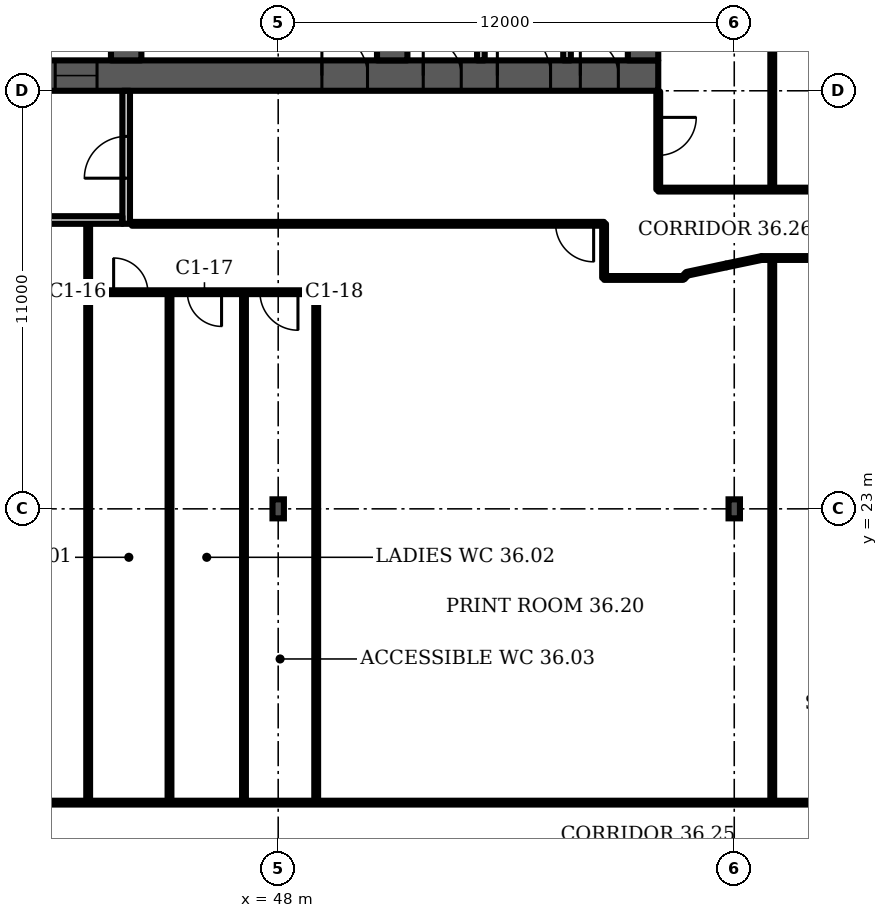
"""IFC4 building model, lengths in metres.
Left out: names, types, materials, properties, quantities, classifications, styles, units other than length and angle.
Written with IfcOpenShell. Run it as: python <this file> out.ifc"""

import sys

from ifc_helpers import new_model, si_unit, direction, frame, frame_2d, origin, origin_2d, place, context, subcontext, project, spatial, polyline, rectangle, i_section, outline, extrude, element, fill, save


model = new_model("IFC4")
c1 = context("Model", 3, precision=1e-05, world=origin(), true_north=direction((0.0, 1.0)))
c2 = subcontext(c1, "Body", "Model", "MODEL_VIEW")
j1 = project(units=[si_unit("LENGTHUNIT", "METRE"), si_unit("PLANEANGLEUNIT", "RADIAN")], contexts=[c1])
p1 = place(None, origin())
s1 = spatial("IfcSite", under=j1, at=p1, CompositionType="ELEMENT")
p2 = place(p1, origin())
s2 = spatial("IfcBuilding", under=s1, at=p2, CompositionType="ELEMENT")
p3 = place(p2, frame((0.0, 0.0, 151.9)))
s3 = spatial("IfcBuildingStorey", under=s2, at=p3, CompositionType="ELEMENT", Elevation=151.9)
p4 = place(p3, frame((16.0, 34.4, 0.0), z_axis=(0.0, 0.0, 1.0), x_axis=(1.0, 0.0, 0.0)))
e1 = element("IfcWall", 1, at=p4, inside=s3, PredefinedType="SHEAR", context=c2, shape_type="SweptSolid", body=[
    extrude(rectangle(XDim=42.0, YDim=0.8, at=frame_2d((21.0, 0.0))), origin(), (0.0, 0.0, 1.0), 3.6),
])
p5 = place(p4, frame((3.2, 0.0, 0.0)))
e2 = element("IfcOpeningElement", 2, at=p5, cuts=e1, PredefinedType="OPENING", context=c2, shape_type="SweptSolid", body=[
    extrude(rectangle(XDim=1.0, YDim=2.1, at=frame_2d((0.5, 1.05))), frame((0.0, 0.41, 0.0), z_axis=(0.0, -1.0, 0.0), x_axis=(1.0, 0.0, 0.0)), (0.0, 0.0, 1.0), 0.82),
])
p6 = place(p4, frame((7.65, 0.0, 0.0)))
e3 = element("IfcOpeningElement", 3, at=p6, cuts=e1, PredefinedType="OPENING", context=c2, shape_type="SweptSolid", body=[
    extrude(rectangle(XDim=1.2, YDim=2.1, at=frame_2d((0.6, 1.05))), frame((0.0, 0.41, 0.0), z_axis=(0.0, -1.0, 0.0), x_axis=(1.0, 0.0, 0.0)), (0.0, 0.0, 1.0), 0.82),
])
p7 = place(p4, frame((14.767, 0.0, 0.0)))
e4 = element("IfcOpeningElement", 4, at=p7, cuts=e1, PredefinedType="OPENING", context=c2, shape_type="SweptSolid", body=[
    extrude(rectangle(XDim=1.1, YDim=2.1, at=frame_2d((0.55, 1.05))), frame((0.0, 0.41, 0.0), z_axis=(0.0, -1.0, 0.0), x_axis=(1.0, 0.0, 0.0)), (0.0, 0.0, 1.0), 0.82),
])
p8 = place(p4, frame((19.133, 0.0, 0.0)))
e5 = element("IfcOpeningElement", 5, at=p8, cuts=e1, PredefinedType="OPENING", context=c2, shape_type="SweptSolid", body=[
    extrude(rectangle(XDim=1.1, YDim=2.1, at=frame_2d((0.55, 1.05))), frame((0.0, 0.41, 0.0), z_axis=(0.0, -1.0, 0.0), x_axis=(1.0, 0.0, 0.0)), (0.0, 0.0, 1.0), 0.82),
])
p9 = place(p4, frame((16.8, 0.0, 0.0)))
e6 = element("IfcOpeningElement", 6, at=p9, cuts=e1, PredefinedType="OPENING", context=c2, shape_type="SweptSolid", body=[
    extrude(rectangle(XDim=1.4, YDim=2.1, at=frame_2d((0.7, 1.05))), frame((0.0, 0.41, 0.0), z_axis=(0.0, -1.0, 0.0), x_axis=(1.0, 0.0, 0.0)), (0.0, 0.0, 1.0), 0.82),
])
p10 = place(p4, frame((21.767, 0.0, 0.0)))
e7 = element("IfcOpeningElement", 7, at=p10, cuts=e1, PredefinedType="OPENING", context=c2, shape_type="SweptSolid", body=[
    extrude(rectangle(XDim=1.1, YDim=2.1, at=frame_2d((0.55, 1.05))), frame((0.0, 0.41, 0.0), z_axis=(0.0, -1.0, 0.0), x_axis=(1.0, 0.0, 0.0)), (0.0, 0.0, 1.0), 0.82),
])
p11 = place(p4, frame((23.95, 0.0, 0.0)))
e8 = element("IfcOpeningElement", 8, at=p11, cuts=e1, PredefinedType="OPENING", context=c2, shape_type="SweptSolid", body=[
    extrude(rectangle(XDim=1.1, YDim=2.1, at=frame_2d((0.55, 1.05))), frame((0.0, 0.41, 0.0), z_axis=(0.0, -1.0, 0.0), x_axis=(1.0, 0.0, 0.0)), (0.0, 0.0, 1.0), 0.82),
])
p12 = place(p4, frame((26.133, 0.0, 0.0)))
e9 = element("IfcOpeningElement", 9, at=p12, cuts=e1, PredefinedType="OPENING", context=c2, shape_type="SweptSolid", body=[
    extrude(rectangle(XDim=1.1, YDim=2.1, at=frame_2d((0.55, 1.05))), frame((0.0, 0.41, 0.0), z_axis=(0.0, -1.0, 0.0), x_axis=(1.0, 0.0, 0.0)), (0.0, 0.0, 1.0), 0.82),
])
p13 = place(p4, frame((33.15, 0.0, 0.0)))
e10 = element("IfcOpeningElement", 10, at=p13, cuts=e1, PredefinedType="OPENING", context=c2, shape_type="SweptSolid", body=[
    extrude(rectangle(XDim=1.2, YDim=2.1, at=frame_2d((0.6, 1.05))), frame((0.0, 0.41, 0.0), z_axis=(0.0, -1.0, 0.0), x_axis=(1.0, 0.0, 0.0)), (0.0, 0.0, 1.0), 0.82),
])
p14 = place(p4, frame((35.817, 0.0, 0.0)))
e11 = element("IfcOpeningElement", 11, at=p14, cuts=e1, PredefinedType="OPENING", context=c2, shape_type="SweptSolid", body=[
    extrude(rectangle(XDim=1.0, YDim=2.1, at=frame_2d((0.5, 1.05))), frame((0.0, 0.41, 0.0), z_axis=(0.0, -1.0, 0.0), x_axis=(1.0, 0.0, 0.0)), (0.0, 0.0, 1.0), 0.82),
])
p15 = place(p4, frame((39.95, 0.0, 0.0)))
e12 = element("IfcOpeningElement", 12, at=p15, cuts=e1, PredefinedType="OPENING", context=c2, shape_type="SweptSolid", body=[
    extrude(rectangle(XDim=1.0, YDim=2.1, at=frame_2d((0.5, 1.05))), frame((0.0, 0.41, 0.0), z_axis=(0.0, -1.0, 0.0), x_axis=(1.0, 0.0, 0.0)), (0.0, 0.0, 1.0), 0.82),
])
p16 = place(p4, frame((37.767, 0.0, 0.0)))
e13 = element("IfcOpeningElement", 13, at=p16, cuts=e1, PredefinedType="OPENING", context=c2, shape_type="SweptSolid", body=[
    extrude(rectangle(XDim=1.4, YDim=2.1, at=frame_2d((0.7, 1.05))), frame((0.0, 0.41, 0.0), z_axis=(0.0, -1.0, 0.0), x_axis=(1.0, 0.0, 0.0)), (0.0, 0.0, 1.0), 0.82),
])
p17 = place(p3, frame((44.0, 34.8, 0.0), z_axis=(0.0, 0.0, 1.0), x_axis=(0.0, 1.0, 0.0)))
e14 = element("IfcWall", 14, at=p17, inside=s3, PredefinedType="SHEAR", context=c2, shape_type="SweptSolid", body=[
    extrude(rectangle(XDim=14.374, YDim=0.8, at=frame_2d((7.187, 0.0))), origin(), (0.0, 0.0, 1.0), 3.6),
])
p18 = place(p17, frame((11.312, 0.0, 0.0)))
e15 = element("IfcOpeningElement", 15, at=p18, cuts=e14, PredefinedType="OPENING", context=c2, shape_type="SweptSolid", body=[
    extrude(rectangle(XDim=1.0, YDim=2.1, at=frame_2d((0.5, 1.05))), frame((0.0, 0.41, 0.0), z_axis=(0.0, -1.0, 0.0), x_axis=(1.0, 0.0, 0.0)), (0.0, 0.0, 1.0), 0.82),
])
p19 = place(p17, frame((3.6, 0.0, 0.0)))
e16 = element("IfcOpeningElement", 16, at=p19, cuts=e14, PredefinedType="OPENING", context=c2, shape_type="SweptSolid", body=[
    extrude(rectangle(XDim=1.1, YDim=2.1, at=frame_2d((0.55, 1.05))), frame((0.0, 0.41, 0.0), z_axis=(0.0, -1.0, 0.0), x_axis=(1.0, 0.0, 0.0)), (0.0, 0.0, 1.0), 0.82),
])
p20 = place(p3, frame((51.0, 34.8, 0.0), z_axis=(0.0, 0.0, 1.0), x_axis=(0.0, 1.0, 0.0)))
e17 = element("IfcWall", 17, at=p20, inside=s3, PredefinedType="SHEAR", context=c2, shape_type="SweptSolid", body=[
    extrude(rectangle(XDim=13.762, YDim=0.8, at=frame_2d((6.881, 0.0))), origin(), (0.0, 0.0, 1.0), 3.6),
])
p21 = place(p20, frame((3.6, 0.0, 0.0)))
e18 = element("IfcOpeningElement", 18, at=p21, cuts=e17, PredefinedType="OPENING", context=c2, shape_type="SweptSolid", body=[
    extrude(rectangle(XDim=1.1, YDim=2.1, at=frame_2d((0.55, 1.05))), frame((0.0, 0.41, 0.0), z_axis=(0.0, -1.0, 0.0), x_axis=(1.0, 0.0, 0.0)), (0.0, 0.0, 1.0), 0.82),
])
p22 = place(p3, frame((57.6, 34.8, 0.0), z_axis=(0.0, 0.0, 1.0), x_axis=(0.0, 1.0, 0.0)))
e19 = element("IfcWall", 19, at=p22, inside=s3, PredefinedType="SHEAR", context=c2, shape_type="SweptSolid", body=[
    extrude(rectangle(XDim=13.184, YDim=0.8, at=frame_2d((6.592, 0.0))), origin(), (0.0, 0.0, 1.0), 3.6),
])
for number, where, z_axis, x_axis in (
    (20, (48.0, 23.0, 0.0), (0.0, 0.0, 1.0), (1.0, 0.0, 0.0)),
    (21, (60.0, 23.0, 0.0), (0.0, 0.0, 1.0), (1.0, 0.0, 0.0)),
):
    element("IfcColumn", number, at=place(p3, frame(where, z_axis=z_axis, x_axis=x_axis)), inside=s3, PredefinedType="COLUMN", context=c2, shape_type="SweptSolid", body=[
        extrude(i_section(OverallWidth=0.3, OverallDepth=0.5, WebThickness=0.014, FlangeThickness=0.028, FilletRadius=0.027, at=origin_2d()), origin(), (0.0, 0.0, 1.0), 3.6),
    ])
p23 = place(p3, origin())
e22 = element("IfcWall", 22, at=p23, inside=s3, PredefinedType="PARTITIONING", context=c2, shape_type="SweptSolid", body=[
    extrude(outline(polyline([(41.567, 37.1), (39.433, 37.1), (39.433, 34.8), (39.233, 34.8), (39.233, 37.65), (37.4, 37.65), (37.4, 37.85), (39.233, 37.85), (39.433, 37.85), (39.433, 37.3), (41.567, 37.3), (41.567, 37.55), (41.767, 37.55), (43.6, 37.55), (43.6, 37.35), (41.767, 37.35), (41.767, 34.8), (41.567, 34.8), (41.567, 37.1)])), origin(), (0.0, 0.0, 1.0), 3.2),
])
p24 = place(p3, origin())
e23 = element("IfcWall", 23, at=p24, inside=s3, PredefinedType="PARTITIONING", context=c2, shape_type="SweptSolid", body=[
    extrude(outline(polyline([(53.233, 34.8), (53.233, 37.3), (53.433, 37.3), (53.433, 34.8), (53.233, 34.8)])), origin(), (0.0, 0.0, 1.0), 3.2),
])
p25 = place(p3, origin())
e24 = element("IfcWall", 24, at=p25, inside=s3, PredefinedType="PARTITIONING", context=c2, shape_type="SweptSolid", body=[
    extrude(outline(polyline([(55.5, 34.8), (55.5, 37.3), (55.7, 37.3), (55.7, 34.8), (55.5, 34.8)])), origin(), (0.0, 0.0, 1.0), 3.2),
])
p26 = place(p3, frame((44.0, 30.5, 0.0), z_axis=(0.0, 0.0, 1.0), x_axis=(0.0, 1.0, 0.0)))
e25 = element("IfcWall", 25, at=p26, inside=s3, PredefinedType="PARTITIONING", context=c2, shape_type="SweptSolid", body=[
    extrude(rectangle(XDim=3.5, YDim=0.2, at=frame_2d((1.75, 0.0))), origin(), (0.0, 0.0, 1.0), 3.2),
])
p27 = place(p26, frame((1.2, 0.0, 0.0)))
e26 = element("IfcOpeningElement", 26, at=p27, cuts=e25, PredefinedType="OPENING", context=c2, shape_type="SweptSolid", body=[
    extrude(rectangle(XDim=1.1, YDim=2.1, at=frame_2d((0.55, 1.05))), frame((0.0, 0.11, 0.0), z_axis=(0.0, -1.0, 0.0), x_axis=(1.0, 0.0, 0.0)), (0.0, 0.0, 1.0), 0.22),
])
p28 = place(p3, frame((41.1, 30.6, 0.0), z_axis=(0.0, 0.0, 1.0), x_axis=(1.0, 0.0, 0.0)))
e27 = element("IfcWall", 27, at=p28, inside=s3, PredefinedType="PARTITIONING", context=c2, shape_type="SweptSolid", body=[
    extrude(rectangle(XDim=2.8, YDim=0.2, at=frame_2d((1.4, 0.0))), origin(), (0.0, 0.0, 1.0), 3.2),
])
p29 = place(p3, frame((18.2, 15.27, 0.0), z_axis=(0.0, 0.0, 1.0), x_axis=(1.0, 0.0, 0.0)))
e28 = element("IfcWall", 28, at=p29, inside=s3, PredefinedType="PARTITIONING", context=c2, shape_type="SweptSolid", body=[
    extrude(rectangle(XDim=62.291, YDim=0.1, at=frame_2d((31.146, 0.0))), origin(), (0.0, 0.0, 1.0), 2.58),
])
p30 = place(p29, frame((0.38, 0.0, 0.0)))
e29 = element("IfcOpeningElement", 29, at=p30, cuts=e28, PredefinedType="OPENING", context=c2, shape_type="SweptSolid", body=[
    extrude(rectangle(XDim=1.0, YDim=2.1, at=frame_2d((0.5, 1.05))), frame((0.0, 0.06, 0.0), z_axis=(0.0, -1.0, 0.0), x_axis=(1.0, 0.0, 0.0)), (0.0, 0.0, 1.0), 0.12),
])
p31 = place(p29, frame((58.102, 0.0, 0.0)))
e30 = element("IfcOpeningElement", 30, at=p31, cuts=e28, PredefinedType="OPENING", context=c2, shape_type="SweptSolid", body=[
    extrude(rectangle(XDim=1.0, YDim=2.1, at=frame_2d((0.5, 1.05))), frame((0.0, 0.06, 0.0), z_axis=(0.0, -1.0, 0.0), x_axis=(1.0, 0.0, 0.0)), (0.0, 0.0, 1.0), 0.12),
])
p32 = place(p3, frame((43.0, 15.27, 0.0), z_axis=(0.0, 0.0, 1.0), x_axis=(0.0, 1.0, 0.0)))
e31 = element("IfcWall", 31, at=p32, inside=s3, PredefinedType="PARTITIONING", context=c2, shape_type="SweptSolid", body=[
    extrude(rectangle(XDim=15.22, YDim=0.1, at=frame_2d((7.61, 0.0))), origin(), (0.0, 0.0, 1.0), 3.2),
])
p33 = place(p3, frame((43.0, 28.7, 0.0), z_axis=(0.0, 0.0, 1.0), x_axis=(1.0, 0.0, 0.0)))
e32 = element("IfcWall", 32, at=p33, inside=s3, PredefinedType="PARTITIONING", context=c2, shape_type="SweptSolid", body=[
    extrude(rectangle(XDim=6.0, YDim=0.1, at=frame_2d((3.0, 0.0))), origin(), (0.0, 0.0, 1.0), 3.2),
])
p34 = place(p33, frame((0.67, 0.0, 0.0)))
e33 = element("IfcOpeningElement", 33, at=p34, cuts=e32, PredefinedType="OPENING", context=c2, shape_type="SweptSolid", body=[
    extrude(rectangle(XDim=0.9, YDim=2.1, at=frame_2d((0.45, 1.05))), frame((0.0, 0.06, 0.0), z_axis=(0.0, -1.0, 0.0), x_axis=(1.0, 0.0, 0.0)), (0.0, 0.0, 1.0), 0.12),
])
p35 = place(p33, frame((2.61, 0.0, 0.0)))
e34 = element("IfcOpeningElement", 34, at=p35, cuts=e32, PredefinedType="OPENING", context=c2, shape_type="SweptSolid", body=[
    extrude(rectangle(XDim=0.9, YDim=2.1, at=frame_2d((0.45, 1.05))), frame((0.0, 0.06, 0.0), z_axis=(0.0, -1.0, 0.0), x_axis=(1.0, 0.0, 0.0)), (0.0, 0.0, 1.0), 0.12),
])
p36 = place(p33, frame((4.52, 0.0, 0.0)))
e35 = element("IfcOpeningElement", 35, at=p36, cuts=e32, PredefinedType="OPENING", context=c2, shape_type="SweptSolid", body=[
    extrude(rectangle(XDim=1.0, YDim=2.1, at=frame_2d((0.5, 1.05))), frame((0.0, 0.06, 0.0), z_axis=(0.0, -1.0, 0.0), x_axis=(1.0, 0.0, 0.0)), (0.0, 0.0, 1.0), 0.12),
])
for number, where, z_axis, x_axis in (
    (36, (45.14, 15.27, 0.0), (0.0, 0.0, 1.0), (0.0, 1.0, 0.0)),
    (37, (47.1, 15.27, 0.0), (0.0, 0.0, 1.0), (0.0, 1.0, 0.0)),
    (38, (49.0, 15.27, 0.0), (0.0, 0.0, 1.0), (0.0, 1.0, 0.0)),
):
    element("IfcWall", number, at=place(p3, frame(where, z_axis=z_axis, x_axis=x_axis)), inside=s3, PredefinedType="PARTITIONING", context=c2, shape_type="SweptSolid", body=[
        extrude(rectangle(XDim=13.43, YDim=0.1, at=frame_2d((6.715, 0.0))), origin(), (0.0, 0.0, 1.0), 3.2),
    ])
p37 = place(p3, frame((56.575, 29.075, 0.0), z_axis=(0.0, 0.0, 1.0), x_axis=(0.0, 1.0, 0.0)))
e39 = element("IfcWall", 39, at=p37, inside=s3, PredefinedType="PARTITIONING", context=c2, shape_type="SweptSolid", body=[
    extrude(rectangle(XDim=1.425, YDim=0.1, at=frame_2d((0.712, 0.0))), origin(), (0.0, 0.0, 1.0), 3.2),
])
p38 = place(p3, frame((56.575, 29.075, 0.0), z_axis=(0.0, 0.0, 1.0), x_axis=(1.0, 0.0, 0.0)))
e40 = element("IfcWall", 40, at=p38, inside=s3, PredefinedType="PARTITIONING", context=c2, shape_type="SweptSolid", body=[
    extrude(rectangle(XDim=2.08, YDim=0.1, at=frame_2d((1.04, 0.0))), origin(), (0.0, 0.0, 1.0), 3.2),
])
p39 = place(p3, frame((58.0, 31.4, 0.0), z_axis=(0.0, 0.0, 1.0), x_axis=(0.0, 1.0, 0.0)))
e41 = element("IfcWall", 41, at=p39, inside=s3, PredefinedType="PARTITIONING", context=c2, shape_type="SweptSolid", body=[
    extrude(rectangle(XDim=2.58, YDim=0.1, at=frame_2d((1.29, 0.0))), origin(), (0.0, 0.0, 1.0), 3.2),
])
p40 = place(p39, frame((0.9, 0.0, 0.0)))
e42 = element("IfcOpeningElement", 42, at=p40, cuts=e41, PredefinedType="OPENING", context=c2, shape_type="SweptSolid", body=[
    extrude(rectangle(XDim=1.0, YDim=2.1, at=frame_2d((0.5, 1.05))), frame((0.0, 0.06, 0.0), z_axis=(0.0, -1.0, 0.0), x_axis=(1.0, 0.0, 0.0)), (0.0, 0.0, 1.0), 0.12),
])
p41 = place(p3, frame((58.0, 31.4, 0.0), z_axis=(0.0, 0.0, 1.0), x_axis=(1.0, 0.0, 0.0)))
e43 = element("IfcWall", 43, at=p41, inside=s3, PredefinedType="PARTITIONING", context=c2, shape_type="SweptSolid", body=[
    extrude(rectangle(XDim=5.905, YDim=0.1, at=frame_2d((2.953, 0.0))), origin(), (0.0, 0.0, 1.0), 3.2),
])
p42 = place(p3, frame((58.655, 29.075, 0.0), z_axis=(0.0, 0.0, 1.0), x_axis=(0.671773, 0.740757, 0.0)))
e44 = element("IfcWall", 44, at=p42, inside=s3, PredefinedType="PARTITIONING", context=c2, shape_type="SweptSolid", body=[
    extrude(rectangle(XDim=0.149, YDim=0.1, at=frame_2d((0.074, 0.0))), origin(), (0.0, 0.0, 1.0), 3.2),
])
p43 = place(p3, frame((58.755, 29.185, 0.0), z_axis=(0.0, 0.0, 1.0), x_axis=(0.97816, 0.207859, 0.0)))
e45 = element("IfcWall", 45, at=p43, inside=s3, PredefinedType="PARTITIONING", context=c2, shape_type="SweptSolid", body=[
    extrude(rectangle(XDim=1.058, YDim=0.1, at=frame_2d((0.529, 0.0))), origin(), (0.0, 0.0, 1.0), 3.2),
])
p44 = place(p3, frame((59.79, 29.405, 0.0), z_axis=(0.0, 0.0, 1.0), x_axis=(0.978703, 0.205299, 0.0)))
e46 = element("IfcWall", 46, at=p44, inside=s3, PredefinedType="PARTITIONING", context=c2, shape_type="SweptSolid", body=[
    extrude(rectangle(XDim=0.95, YDim=0.1, at=frame_2d((0.475, 0.0))), origin(), (0.0, 0.0, 1.0), 3.2),
])
p45 = place(p3, frame((60.72, 29.6, 0.0), z_axis=(0.0, 0.0, 1.0), x_axis=(1.0, 0.0, 0.0)))
e47 = element("IfcWall", 47, at=p45, inside=s3, PredefinedType="PARTITIONING", context=c2, shape_type="SweptSolid", body=[
    extrude(rectangle(XDim=1.385, YDim=0.1, at=frame_2d((0.692, 0.0))), origin(), (0.0, 0.0, 1.0), 3.2),
])
p46 = place(p3, frame((61.0, 15.27, 0.0), z_axis=(0.0, 0.0, 1.0), x_axis=(0.0, 1.0, 0.0)))
e48 = element("IfcWall", 48, at=p46, inside=s3, PredefinedType="PARTITIONING", context=c2, shape_type="SweptSolid", body=[
    extrude(rectangle(XDim=14.33, YDim=0.1, at=frame_2d((7.165, 0.0))), origin(), (0.0, 0.0, 1.0), 3.2),
])
p47 = place(p3, frame((61.0, 31.4, 0.0), z_axis=(0.0, 0.0, 1.0), x_axis=(0.0, 1.0, 0.0)))
e49 = element("IfcWall", 49, at=p47, inside=s3, PredefinedType="PARTITIONING", context=c2, shape_type="SweptSolid", body=[
    extrude(rectangle(XDim=10.58, YDim=0.1, at=frame_2d((5.29, 0.0))), origin(), (0.0, 0.0, 1.0), 3.2),
])
p48 = place(p3, frame((44.15, 30.5, 0.0), z_axis=(0.0, 0.0, 1.0), x_axis=(1.0, 0.0, 0.0)))
e50 = element("IfcWall", 50, at=p48, inside=s3, PredefinedType="PARTITIONING", context=c2, shape_type="SweptSolid", body=[
    extrude(rectangle(XDim=12.425, YDim=0.1, at=frame_2d((6.212, 0.0))), origin(), (0.0, 0.0, 1.0), 3.2),
])
p49 = place(p48, frame((11.15, 0.0, 0.0)))
e51 = element("IfcOpeningElement", 51, at=p49, cuts=e50, PredefinedType="OPENING", context=c2, shape_type="SweptSolid", body=[
    extrude(rectangle(XDim=1.0, YDim=2.1, at=frame_2d((0.5, 1.05))), frame((0.0, 0.06, 0.0), z_axis=(0.0, -1.0, 0.0), x_axis=(1.0, 0.0, 0.0)), (0.0, 0.0, 1.0), 0.12),
])
p50 = place(p12, origin())
e52 = element("IfcDoor", 52, at=p50, inside=s3, OperationType="DOUBLE_DOOR_SLIDING", PredefinedType="DOOR", context=c2, shape_type="SweptSolid", body=[
    extrude(rectangle(XDim=1.1, YDim=2.1, at=frame_2d((0.55, 1.05))), frame((0.0, 0.025, 0.0), z_axis=(0.0, -1.0, 0.0), x_axis=(1.0, 0.0, 0.0)), (0.0, 0.0, 1.0), 0.05),
])
fill(e9, e52)
p51 = place(p13, origin())
e53 = element("IfcDoor", 53, at=p51, inside=s3, OperationType="SINGLE_SWING_LEFT", PredefinedType="DOOR", context=c2, shape_type="SweptSolid", body=[
    extrude(rectangle(XDim=1.2, YDim=2.1, at=frame_2d((0.6, 1.05))), frame((0.0, 0.025, 0.0), z_axis=(0.0, -1.0, 0.0), x_axis=(1.0, 0.0, 0.0)), (0.0, 0.0, 1.0), 0.05),
])
fill(e10, e53)
p52 = place(p14, origin())
e54 = element("IfcDoor", 54, at=p52, inside=s3, OperationType="SINGLE_SWING_LEFT", PredefinedType="DOOR", context=c2, shape_type="SweptSolid", body=[
    extrude(rectangle(XDim=1.0, YDim=2.1, at=frame_2d((0.5, 1.05))), frame((0.0, 0.4, 0.0), z_axis=(0.0, -1.0, 0.0), x_axis=(1.0, 0.0, 0.0)), (0.0, 0.0, 1.0), 0.8),
])
fill(e11, e54)
p53 = place(p15, origin())
e55 = element("IfcDoor", 55, at=p53, inside=s3, OperationType="SINGLE_SWING_LEFT", PredefinedType="DOOR", context=c2, shape_type="SweptSolid", body=[
    extrude(rectangle(XDim=1.0, YDim=2.1, at=frame_2d((0.5, 1.05))), frame((0.0, 0.4, 0.0), z_axis=(0.0, -1.0, 0.0), x_axis=(1.0, 0.0, 0.0)), (0.0, 0.0, 1.0), 0.8),
])
fill(e12, e55)
p54 = place(p16, origin())
e56 = element("IfcDoor", 56, at=p54, inside=s3, OperationType="DOUBLE_DOOR_SINGLE_SWING", PredefinedType="DOOR", context=c2, shape_type="SweptSolid", body=[
    extrude(rectangle(XDim=1.4, YDim=2.1, at=frame_2d((0.7, 1.05))), frame((0.0, 0.025, 0.0), z_axis=(0.0, -1.0, 0.0), x_axis=(1.0, 0.0, 0.0)), (0.0, 0.0, 1.0), 0.05),
])
fill(e13, e56)
p55 = place(p27, origin())
e57 = element("IfcDoor", 57, at=p55, inside=s3, OperationType="SINGLE_SWING_LEFT", PredefinedType="DOOR", context=c2, shape_type="SweptSolid", body=[
    extrude(rectangle(XDim=1.1, YDim=2.1, at=frame_2d((0.55, 1.05))), frame((0.0, 0.025, 0.0), z_axis=(0.0, -1.0, 0.0), x_axis=(1.0, 0.0, 0.0)), (0.0, 0.0, 1.0), 0.05),
])
fill(e26, e57)
p56 = place(p34, origin())
e58 = element("IfcDoor", 58, at=p56, inside=s3, OperationType="SINGLE_SWING_LEFT", PredefinedType="DOOR", context=c2, shape_type="SweptSolid", body=[
    extrude(rectangle(XDim=0.9, YDim=2.1, at=frame_2d((0.45, 1.05))), frame((0.0, 0.025, 0.0), z_axis=(0.0, -1.0, 0.0), x_axis=(1.0, 0.0, 0.0)), (0.0, 0.0, 1.0), 0.05),
])
fill(e33, e58)
p57 = place(p35, origin())
e59 = element("IfcDoor", 59, at=p57, inside=s3, OperationType="SINGLE_SWING_RIGHT", PredefinedType="DOOR", context=c2, shape_type="SweptSolid", body=[
    extrude(rectangle(XDim=0.9, YDim=2.1, at=frame_2d((0.45, 1.05))), frame((0.0, 0.025, 0.0), z_axis=(0.0, -1.0, 0.0), x_axis=(1.0, 0.0, 0.0)), (0.0, 0.0, 1.0), 0.05),
])
fill(e34, e59)
p58 = place(p36, origin())
e60 = element("IfcDoor", 60, at=p58, inside=s3, OperationType="SINGLE_SWING_RIGHT", PredefinedType="DOOR", context=c2, shape_type="SweptSolid", body=[
    extrude(rectangle(XDim=1.0, YDim=2.1, at=frame_2d((0.5, 1.05))), frame((0.0, 0.025, 0.0), z_axis=(0.0, -1.0, 0.0), x_axis=(1.0, 0.0, 0.0)), (0.0, 0.0, 1.0), 0.05),
])
fill(e35, e60)
p59 = place(p49, origin())
e61 = element("IfcDoor", 61, at=p59, inside=s3, OperationType="SINGLE_SWING_RIGHT", PredefinedType="DOOR", context=c2, shape_type="SweptSolid", body=[
    extrude(rectangle(XDim=1.0, YDim=2.1, at=frame_2d((0.5, 1.05))), frame((0.0, 0.025, 0.0), z_axis=(0.0, -1.0, 0.0), x_axis=(1.0, 0.0, 0.0)), (0.0, 0.0, 1.0), 0.05),
])
fill(e51, e61)
p60 = place(p40, origin())
e62 = element("IfcDoor", 62, at=p60, inside=s3, OperationType="SINGLE_SWING_RIGHT", PredefinedType="DOOR", context=c2, shape_type="SweptSolid", body=[
    extrude(rectangle(XDim=1.0, YDim=2.1, at=frame_2d((0.5, 1.05))), frame((0.0, 0.025, 0.0), z_axis=(0.0, -1.0, 0.0), x_axis=(1.0, 0.0, 0.0)), (0.0, 0.0, 1.0), 0.05),
])
fill(e42, e62)
save(model, sys.argv[1])
